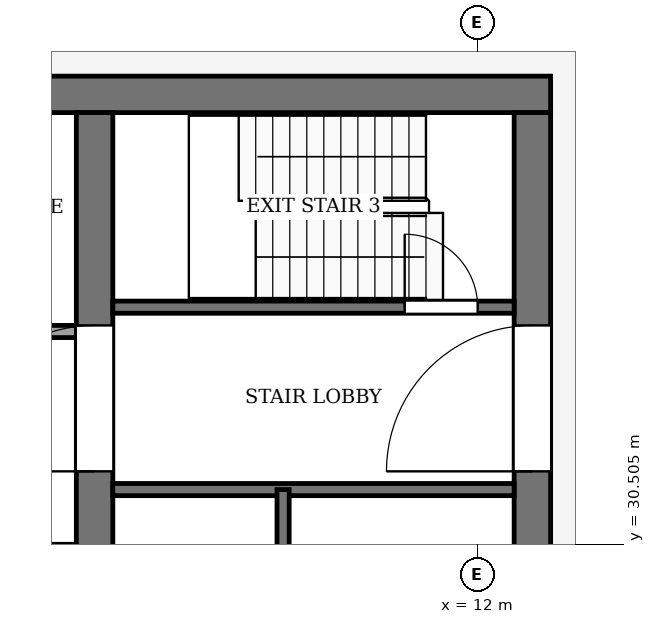
"""IFC4 building model, lengths in metres.
Left out: names, types, materials, properties, quantities, classifications, styles, units other than length and angle.
Written with IfcOpenShell. Run it as: python <this file> out.ifc"""

import sys

from ifc_helpers import new_model, si_unit, direction, frame, frame_2d, origin, place, context, subcontext, project, spatial, rectangle, extrude, element, fill, save


model = new_model("IFC4")
c1 = context("Model", 3, precision=1e-05, world=origin(), true_north=direction((0.0, 1.0)))
c2 = subcontext(c1, "Body", "Model", "MODEL_VIEW")
j1 = project(units=[si_unit("LENGTHUNIT", "METRE"), si_unit("PLANEANGLEUNIT", "RADIAN")], contexts=[c1])
p1 = place(None, origin())
s1 = spatial("IfcSite", under=j1, at=p1, CompositionType="ELEMENT")
p2 = place(p1, origin())
s2 = spatial("IfcBuilding", under=s1, at=p2, CompositionType="ELEMENT")
p3 = place(p2, frame((0.0, 0.0, 306.0)))
s3 = spatial("IfcBuildingStorey", under=s2, at=p3, CompositionType="ELEMENT", Elevation=306.0)
p4 = place(p3, frame((-13.2, 37.9, -0.13), z_axis=(0.0, 0.0, 1.0), x_axis=(1.0, 0.0, 0.0)))
e1 = element("IfcWall", 1, at=p4, inside=s3, PredefinedType="SHEAR", context=c2, shape_type="SweptSolid", body=[
    extrude(rectangle(XDim=26.4, YDim=0.6, at=frame_2d((13.2, 0.0))), origin(), (0.0, 0.0, 1.0), 4.0),
])
p5 = place(p3, frame((12.9, 18.4, -0.13), z_axis=(0.0, 0.0, 1.0), x_axis=(0.0, 1.0, 0.0)))
e2 = element("IfcWall", 2, at=p5, inside=s3, PredefinedType="SHEAR", context=c2, shape_type="SweptSolid", body=[
    extrude(rectangle(XDim=19.2, YDim=0.6, at=frame_2d((9.6, 0.0))), origin(), (0.0, 0.0, 1.0), 4.0),
])
p6 = place(p5, frame((2.8, 0.0, 0.13)))
e3 = element("IfcOpeningElement", 3, at=p6, cuts=e2, PredefinedType="OPENING", context=c2, shape_type="SweptSolid", body=[
    extrude(rectangle(XDim=2.4, YDim=2.4, at=frame_2d((1.2, 1.2))), frame((0.0, 0.31, 0.0), z_axis=(0.0, -1.0, 0.0), x_axis=(1.0, 0.0, 0.0)), (0.0, 0.0, 1.0), 0.62),
])
p7 = place(p5, frame((13.3, 0.0, 0.13)))
e4 = element("IfcOpeningElement", 4, at=p7, cuts=e2, PredefinedType="OPENING", context=c2, shape_type="SweptSolid", body=[
    extrude(rectangle(XDim=2.4, YDim=2.4, at=frame_2d((1.2, 1.2))), frame((0.0, 0.31, 0.0), z_axis=(0.0, -1.0, 0.0), x_axis=(1.0, 0.0, 0.0)), (0.0, 0.0, 1.0), 0.62),
])
p8 = place(p3, frame((5.7, 18.4, -0.13), z_axis=(0.0, 0.0, 1.0), x_axis=(0.0, 1.0, 0.0)))
e5 = element("IfcWall", 5, at=p8, inside=s3, PredefinedType="SHEAR", context=c2, shape_type="SweptSolid", body=[
    extrude(rectangle(XDim=19.2, YDim=0.6, at=frame_2d((9.6, 0.0))), origin(), (0.0, 0.0, 1.0), 4.0),
])
p9 = place(p8, frame((13.3, 0.0, 0.13)))
e6 = element("IfcOpeningElement", 6, at=p9, cuts=e5, PredefinedType="OPENING", context=c2, shape_type="SweptSolid", body=[
    extrude(rectangle(XDim=2.4, YDim=2.4, at=frame_2d((1.2, 1.2))), frame((0.0, 0.31, 0.0), z_axis=(0.0, -1.0, 0.0), x_axis=(1.0, 0.0, 0.0)), (0.0, 0.0, 1.0), 0.62),
])
p10 = place(p3, frame((6.0, 31.4, 0.0), z_axis=(0.0, 0.0, 1.0), x_axis=(1.0, 0.0, 0.0)))
e7 = element("IfcWall", 7, at=p10, inside=s3, PredefinedType="PARTITIONING", context=c2, shape_type="SweptSolid", body=[
    extrude(rectangle(XDim=6.6, YDim=0.2, at=frame_2d((3.3, 0.0))), origin(), (0.0, 0.0, 1.0), 3.87),
])
p11 = place(p3, frame((-5.4, 34.0, 0.0), z_axis=(0.0, 0.0, 1.0), x_axis=(1.0, 0.0, 0.0)))
e8 = element("IfcWall", 8, at=p11, inside=s3, PredefinedType="PARTITIONING", context=c2, shape_type="SweptSolid", body=[
    extrude(rectangle(XDim=10.8, YDim=0.2, at=frame_2d((5.4, 0.0))), origin(), (0.0, 0.0, 1.0), 3.87),
])
p12 = place(p11, frame((6.15, 0.0, 0.0)))
e9 = element("IfcOpeningElement", 9, at=p12, cuts=e8, PredefinedType="OPENING", context=c2, shape_type="SweptSolid", body=[
    extrude(rectangle(XDim=1.2, YDim=2.2, at=frame_2d((0.6, 1.1))), frame((0.0, 0.11, 0.0), z_axis=(0.0, -1.0, 0.0), x_axis=(1.0, 0.0, 0.0)), (0.0, 0.0, 1.0), 0.22),
])
p13 = place(p11, frame((8.95, 0.0, 0.0)))
e10 = element("IfcOpeningElement", 10, at=p13, cuts=e8, PredefinedType="OPENING", context=c2, shape_type="SweptSolid", body=[
    extrude(rectangle(XDim=1.0, YDim=2.1, at=frame_2d((0.5, 1.05))), frame((0.0, 0.11, 0.0), z_axis=(0.0, -1.0, 0.0), x_axis=(1.0, 0.0, 0.0)), (0.0, 0.0, 1.0), 0.22),
])
p14 = place(p3, frame((6.0, 34.4, 0.0), z_axis=(0.0, 0.0, 1.0), x_axis=(1.0, 0.0, 0.0)))
e11 = element("IfcWall", 11, at=p14, inside=s3, PredefinedType="PARTITIONING", context=c2, shape_type="SweptSolid", body=[
    extrude(rectangle(XDim=6.6, YDim=0.2, at=frame_2d((3.3, 0.0))), origin(), (0.0, 0.0, 1.0), 3.87),
])
p15 = place(p14, frame((4.8, 0.0, 0.0)))
e12 = element("IfcOpeningElement", 12, at=p15, cuts=e11, PredefinedType="OPENING", context=c2, shape_type="SweptSolid", body=[
    extrude(rectangle(XDim=1.2, YDim=2.2, at=frame_2d((0.6, 1.1))), frame((0.0, 0.11, 0.0), z_axis=(0.0, -1.0, 0.0), x_axis=(1.0, 0.0, 0.0)), (0.0, 0.0, 1.0), 0.22),
])
p16 = place(p3, frame((8.8, 24.0, 0.0), z_axis=(0.0, 0.0, 1.0), x_axis=(0.0, 1.0, 0.0)))
e13 = element("IfcWall", 13, at=p16, inside=s3, PredefinedType="PARTITIONING", context=c2, shape_type="SweptSolid", body=[
    extrude(rectangle(XDim=7.4, YDim=0.2, at=frame_2d((3.7, 0.0))), origin(), (0.0, 0.0, 1.0), 3.87),
])
p17 = place(p15, origin())
e14 = element("IfcDoor", 14, at=p17, inside=s3, OperationType="SINGLE_SWING_RIGHT", PredefinedType="DOOR", context=c2, shape_type="SweptSolid", body=[
    extrude(rectangle(XDim=1.2, YDim=2.2, at=frame_2d((0.6, 1.1))), frame((0.0, 0.025, 0.0), z_axis=(0.0, -1.0, 0.0), x_axis=(1.0, 0.0, 0.0)), (0.0, 0.0, 1.0), 0.05),
])
fill(e12, e14)
p18 = place(p9, origin())
e15 = element("IfcDoor", 15, at=p18, inside=s3, OperationType="DOUBLE_DOOR_SINGLE_SWING", PredefinedType="DOOR", context=c2, shape_type="SweptSolid", body=[
    extrude(rectangle(XDim=2.4, YDim=2.4, at=frame_2d((1.2, 1.2))), frame((0.0, 0.025, 0.0), z_axis=(0.0, -1.0, 0.0), x_axis=(1.0, 0.0, 0.0)), (0.0, 0.0, 1.0), 0.05),
])
fill(e6, e15)
p19 = place(p7, origin())
e16 = element("IfcDoor", 16, at=p19, inside=s3, OperationType="DOUBLE_DOOR_SINGLE_SWING", PredefinedType="DOOR", context=c2, shape_type="SweptSolid", body=[
    extrude(rectangle(XDim=2.4, YDim=2.4, at=frame_2d((1.2, 1.2))), frame((0.0, 0.025, 0.0), z_axis=(0.0, -1.0, 0.0), x_axis=(1.0, 0.0, 0.0)), (0.0, 0.0, 1.0), 0.05),
])
fill(e4, e16)
save(model, sys.argv[1])
